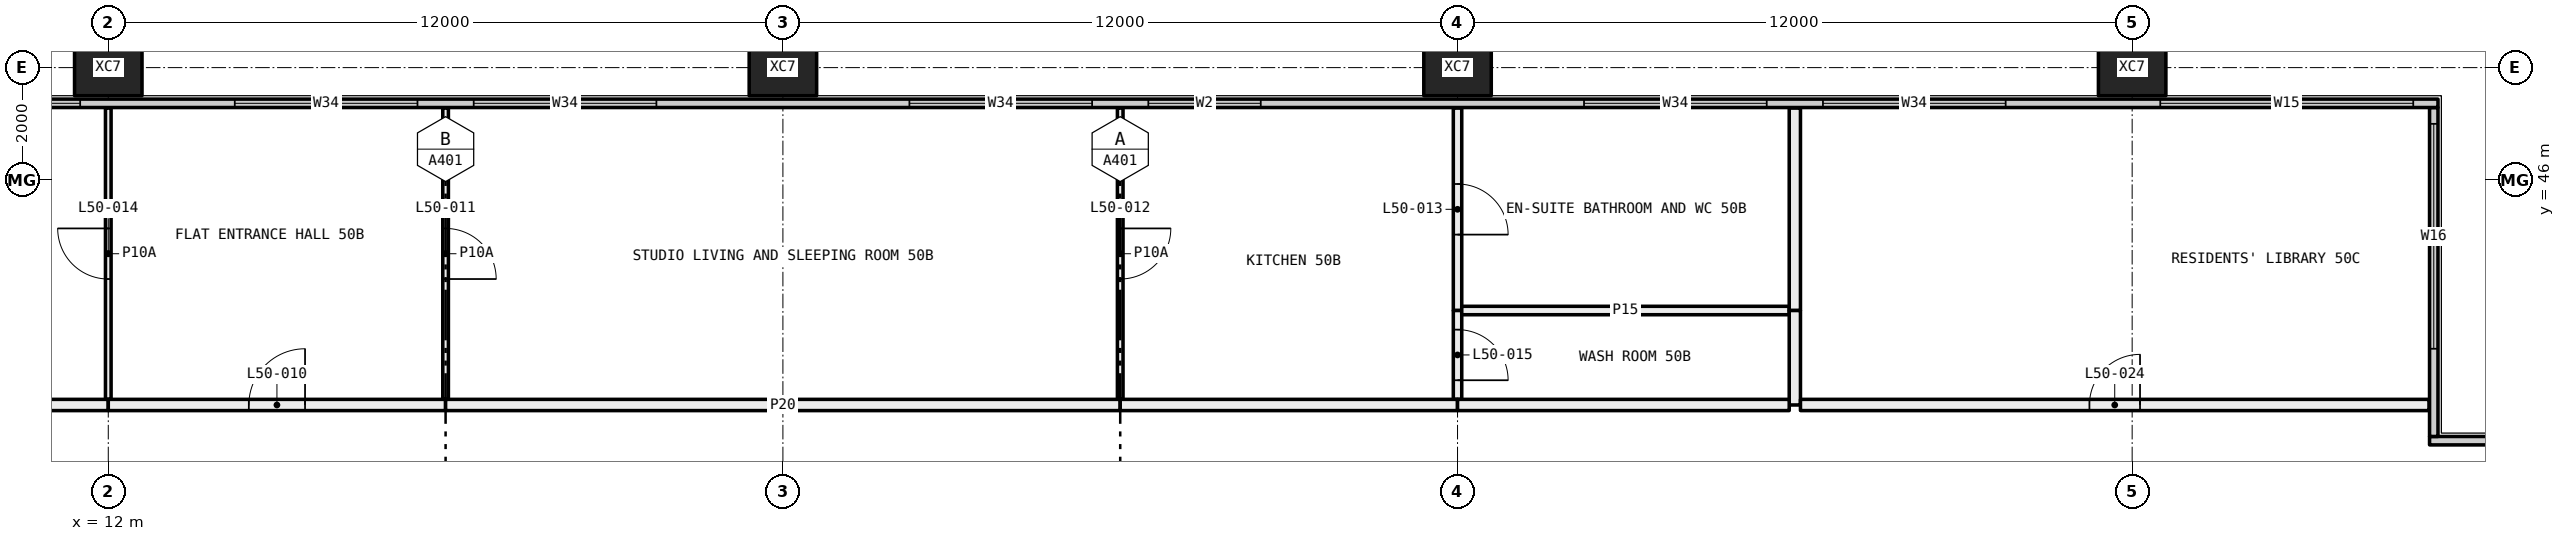
"""IFC4 building model, lengths in metres.
Left out: names, types, materials, properties, quantities, classifications, styles, units other than length and angle.
Written with IfcOpenShell. Run it as: python <this file> out.ifc"""

import sys

from ifc_helpers import new_model, si_unit, direction, frame, frame_2d, origin, origin_2d, place, context, subcontext, project, spatial, rectangle, hollow_rectangle, extrude, element, fill, save


model = new_model("IFC4")
c1 = context("Model", 3, precision=1e-05, world=origin(), true_north=direction((0.0, 1.0)))
c2 = subcontext(c1, "Body", "Model", "MODEL_VIEW")
j1 = project(units=[si_unit("LENGTHUNIT", "METRE"), si_unit("PLANEANGLEUNIT", "RADIAN")], contexts=[c1])
p1 = place(None, origin())
s1 = spatial("IfcSite", under=j1, at=p1, CompositionType="ELEMENT")
p2 = place(p1, origin())
s2 = spatial("IfcBuilding", under=s1, at=p2, CompositionType="ELEMENT")
p3 = place(p2, frame((0.0, 0.0, 189.3)))
s3 = spatial("IfcBuildingStorey", under=s2, at=p3, CompositionType="ELEMENT", Elevation=189.3)
for number, where, z_axis, x_axis in (
    (1, (12.0, 48.0, -0.4), (0.0, 0.0, 1.0), (1.0, 0.0, 0.0)),
    (2, (24.0, 48.0, -0.4), (0.0, 0.0, 1.0), (1.0, 0.0, 0.0)),
    (3, (36.0, 48.0, -0.4), (0.0, 0.0, 1.0), (1.0, 0.0, 0.0)),
    (4, (48.0, 48.0, -0.4), (0.0, 0.0, 1.0), (1.0, 0.0, 0.0)),
):
    element("IfcColumn", number, at=place(p3, frame(where, z_axis=z_axis, x_axis=x_axis)), inside=s3, PredefinedType="COLUMN", context=c2, shape_type="SweptSolid", body=[
        extrude(hollow_rectangle(XDim=1.2, YDim=1.0, WallThickness=0.045, at=origin_2d()), origin(), (0.0, 0.0, 1.0), 3.45),
    ])
p4 = place(p3, frame((53.29, 41.365, 0.0), z_axis=(0.0, 0.0, 1.0), x_axis=(1.0, 0.0, 0.0)))
e5 = element("IfcWall", 5, at=p4, inside=s3, PredefinedType="ELEMENTEDWALL", context=c2, shape_type="SweptSolid", body=[
    extrude(rectangle(XDim=6.15, YDim=0.15, at=frame_2d((3.075, 0.0))), origin(), (0.0, 0.0, 1.0), 3.05),
])
p5 = place(p4, frame((1.71, 0.0, 0.45)))
e6 = element("IfcOpeningElement", 6, at=p5, cuts=e5, PredefinedType="OPENING", context=c2, shape_type="SweptSolid", body=[
    extrude(rectangle(XDim=4.0, YDim=2.55, at=frame_2d((2.0, 1.275))), frame((0.0, 0.085, 0.0), z_axis=(0.0, -1.0, 0.0), x_axis=(1.0, 0.0, 0.0)), (0.0, 0.0, 1.0), 0.17),
])
p6 = place(p3, frame((53.365, 41.44, 0.0), z_axis=(0.0, 0.0, 1.0), x_axis=(0.0, 1.0, 0.0)))
e7 = element("IfcWall", 7, at=p6, inside=s3, PredefinedType="ELEMENTEDWALL", context=c2, shape_type="SweptSolid", body=[
    extrude(rectangle(XDim=5.85, YDim=0.15, at=frame_2d((2.925, 0.0))), origin(), (0.0, 0.0, 1.0), 3.05),
])
p7 = place(p6, frame((1.56, 0.0, 0.45)))
e8 = element("IfcOpeningElement", 8, at=p7, cuts=e7, PredefinedType="OPENING", context=c2, shape_type="SweptSolid", body=[
    extrude(rectangle(XDim=4.0, YDim=2.55, at=frame_2d((2.0, 1.275))), frame((0.0, 0.085, 0.0), z_axis=(0.0, -1.0, 0.0), x_axis=(1.0, 0.0, 0.0)), (0.0, 0.0, 1.0), 0.17),
])
p8 = place(p3, frame((6.56, 47.365, 0.0), z_axis=(0.0, 0.0, 1.0), x_axis=(1.0, 0.0, 0.0)))
e9 = element("IfcWall", 9, at=p8, inside=s3, PredefinedType="ELEMENTEDWALL", context=c2, shape_type="SweptSolid", body=[
    extrude(rectangle(XDim=46.88, YDim=0.15, at=frame_2d((23.44, 0.0))), origin(), (0.0, 0.0, 1.0), 3.05),
])
p9 = place(p8, frame((0.44, 0.0, 0.45)))
e10 = element("IfcOpeningElement", 10, at=p9, cuts=e9, PredefinedType="OPENING", context=c2, shape_type="SweptSolid", body=[
    extrude(rectangle(XDim=4.5, YDim=2.55, at=frame_2d((2.25, 1.275))), frame((0.0, 0.085, 0.0), z_axis=(0.0, -1.0, 0.0), x_axis=(1.0, 0.0, 0.0)), (0.0, 0.0, 1.0), 0.17),
])
p10 = place(p8, frame((7.69, 0.0, 0.45)))
e11 = element("IfcOpeningElement", 11, at=p10, cuts=e9, PredefinedType="OPENING", context=c2, shape_type="SweptSolid", body=[
    extrude(rectangle(XDim=3.25, YDim=2.55, at=frame_2d((1.625, 1.275))), frame((0.0, 0.085, 0.0), z_axis=(0.0, -1.0, 0.0), x_axis=(1.0, 0.0, 0.0)), (0.0, 0.0, 1.0), 0.17),
])
p11 = place(p8, frame((11.94, 0.0, 0.45)))
e12 = element("IfcOpeningElement", 12, at=p11, cuts=e9, PredefinedType="OPENING", context=c2, shape_type="SweptSolid", body=[
    extrude(rectangle(XDim=3.25, YDim=2.55, at=frame_2d((1.625, 1.275))), frame((0.0, 0.085, 0.0), z_axis=(0.0, -1.0, 0.0), x_axis=(1.0, 0.0, 0.0)), (0.0, 0.0, 1.0), 0.17),
])
p12 = place(p8, frame((19.69, 0.0, 0.45)))
e13 = element("IfcOpeningElement", 13, at=p12, cuts=e9, PredefinedType="OPENING", context=c2, shape_type="SweptSolid", body=[
    extrude(rectangle(XDim=3.25, YDim=2.55, at=frame_2d((1.625, 1.275))), frame((0.0, 0.085, 0.0), z_axis=(0.0, -1.0, 0.0), x_axis=(1.0, 0.0, 0.0)), (0.0, 0.0, 1.0), 0.17),
])
p13 = place(p8, frame((23.94, 0.0, 0.45)))
e14 = element("IfcOpeningElement", 14, at=p13, cuts=e9, PredefinedType="OPENING", context=c2, shape_type="SweptSolid", body=[
    extrude(rectangle(XDim=2.0, YDim=2.55, at=frame_2d((1.0, 1.275))), frame((0.0, 0.085, 0.0), z_axis=(0.0, -1.0, 0.0), x_axis=(1.0, 0.0, 0.0)), (0.0, 0.0, 1.0), 0.17),
])
p14 = place(p8, frame((31.69, 0.0, 0.45)))
e15 = element("IfcOpeningElement", 15, at=p14, cuts=e9, PredefinedType="OPENING", context=c2, shape_type="SweptSolid", body=[
    extrude(rectangle(XDim=3.25, YDim=2.55, at=frame_2d((1.625, 1.275))), frame((0.0, 0.085, 0.0), z_axis=(0.0, -1.0, 0.0), x_axis=(1.0, 0.0, 0.0)), (0.0, 0.0, 1.0), 0.17),
])
p15 = place(p8, frame((35.94, 0.0, 0.45)))
e16 = element("IfcOpeningElement", 16, at=p15, cuts=e9, PredefinedType="OPENING", context=c2, shape_type="SweptSolid", body=[
    extrude(rectangle(XDim=3.25, YDim=2.55, at=frame_2d((1.625, 1.275))), frame((0.0, 0.085, 0.0), z_axis=(0.0, -1.0, 0.0), x_axis=(1.0, 0.0, 0.0)), (0.0, 0.0, 1.0), 0.17),
])
p16 = place(p8, frame((41.94, 0.0, 0.45)))
e17 = element("IfcOpeningElement", 17, at=p16, cuts=e9, PredefinedType="OPENING", context=c2, shape_type="SweptSolid", body=[
    extrude(rectangle(XDim=4.5, YDim=2.55, at=frame_2d((2.25, 1.275))), frame((0.0, 0.085, 0.0), z_axis=(0.0, -1.0, 0.0), x_axis=(1.0, 0.0, 0.0)), (0.0, 0.0, 1.0), 0.17),
])
p17 = place(p3, frame((12.0, 42.1, 0.0), z_axis=(0.0, 0.0, 1.0), x_axis=(0.0, 1.0, 0.0)))
e18 = element("IfcWall", 18, at=p17, inside=s3, PredefinedType="PARTITIONING", context=c2, shape_type="SweptSolid", body=[
    extrude(rectangle(XDim=5.18, YDim=0.1, at=frame_2d((2.59, 0.0))), origin(), (0.0, 0.0, 1.0), 3.05),
])
p18 = place(p17, frame((2.14, 0.0, 0.0)))
e19 = element("IfcOpeningElement", 19, at=p18, cuts=e18, PredefinedType="OPENING", context=c2, shape_type="SweptSolid", body=[
    extrude(rectangle(XDim=0.9, YDim=2.1, at=frame_2d((0.45, 1.05))), frame((0.0, 0.06, 0.0), z_axis=(0.0, -1.0, 0.0), x_axis=(1.0, 0.0, 0.0)), (0.0, 0.0, 1.0), 0.12),
])
p19 = place(p3, frame((10.1, 42.0, 0.0), z_axis=(0.0, 0.0, 1.0), x_axis=(1.0, 0.0, 0.0)))
e20 = element("IfcWall", 20, at=p19, inside=s3, PredefinedType="PARTITIONING", context=c2, shape_type="SweptSolid", body=[
    extrude(rectangle(XDim=1.9, YDim=0.2, at=frame_2d((0.95, 0.0))), origin(), (0.0, 0.0, 1.0), 3.05),
])
p20 = place(p3, frame((18.0, 42.1, 0.0), z_axis=(0.0, 0.0, 1.0), x_axis=(0.0, 1.0, 0.0)))
e21 = element("IfcWall", 21, at=p20, inside=s3, PredefinedType="PARTITIONING", context=c2, shape_type="SweptSolid", body=[
    extrude(rectangle(XDim=5.18, YDim=0.1, at=frame_2d((2.59, 0.0))), origin(), (0.0, 0.0, 1.0), 3.05),
])
p21 = place(p20, frame((2.14, 0.0, 0.0)))
e22 = element("IfcOpeningElement", 22, at=p21, cuts=e21, PredefinedType="OPENING", context=c2, shape_type="SweptSolid", body=[
    extrude(rectangle(XDim=0.9, YDim=2.1, at=frame_2d((0.45, 1.05))), frame((0.0, 0.06, 0.0), z_axis=(0.0, -1.0, 0.0), x_axis=(1.0, 0.0, 0.0)), (0.0, 0.0, 1.0), 0.12),
])
p22 = place(p3, frame((12.0, 42.0, 0.0), z_axis=(0.0, 0.0, 1.0), x_axis=(1.0, 0.0, 0.0)))
e23 = element("IfcWall", 23, at=p22, inside=s3, PredefinedType="PARTITIONING", context=c2, shape_type="SweptSolid", body=[
    extrude(rectangle(XDim=6.0, YDim=0.2, at=frame_2d((3.0, 0.0))), origin(), (0.0, 0.0, 1.0), 3.05),
])
p23 = place(p22, frame((2.5, 0.0, 0.0)))
e24 = element("IfcOpeningElement", 24, at=p23, cuts=e23, PredefinedType="OPENING", context=c2, shape_type="SweptSolid", body=[
    extrude(rectangle(XDim=1.0, YDim=2.1, at=frame_2d((0.5, 1.05))), frame((0.0, 0.11, 0.0), z_axis=(0.0, -1.0, 0.0), x_axis=(1.0, 0.0, 0.0)), (0.0, 0.0, 1.0), 0.22),
])
p24 = place(p3, frame((30.0, 42.1, 0.0), z_axis=(0.0, 0.0, 1.0), x_axis=(0.0, 1.0, 0.0)))
e25 = element("IfcWall", 25, at=p24, inside=s3, PredefinedType="PARTITIONING", context=c2, shape_type="SweptSolid", body=[
    extrude(rectangle(XDim=5.18, YDim=0.1, at=frame_2d((2.59, 0.0))), origin(), (0.0, 0.0, 1.0), 3.05),
])
p25 = place(p24, frame((2.14, 0.0, 0.0)))
e26 = element("IfcOpeningElement", 26, at=p25, cuts=e25, PredefinedType="OPENING", context=c2, shape_type="SweptSolid", body=[
    extrude(rectangle(XDim=0.9, YDim=2.1, at=frame_2d((0.45, 1.05))), frame((0.0, 0.06, 0.0), z_axis=(0.0, -1.0, 0.0), x_axis=(1.0, 0.0, 0.0)), (0.0, 0.0, 1.0), 0.12),
])
p26 = place(p3, frame((18.0, 42.0, 0.0), z_axis=(0.0, 0.0, 1.0), x_axis=(1.0, 0.0, 0.0)))
e27 = element("IfcWall", 27, at=p26, inside=s3, PredefinedType="PARTITIONING", context=c2, shape_type="SweptSolid", body=[
    extrude(rectangle(XDim=12.0, YDim=0.2, at=frame_2d((6.0, 0.0))), origin(), (0.0, 0.0, 1.0), 3.05),
])
p27 = place(p3, frame((36.0, 43.68, 0.0), z_axis=(0.0, 0.0, 1.0), x_axis=(0.0, 1.0, 0.0)))
e28 = element("IfcWall", 28, at=p27, inside=s3, PredefinedType="PARTITIONING", context=c2, shape_type="SweptSolid", body=[
    extrude(rectangle(XDim=3.6, YDim=0.15, at=frame_2d((1.8, 0.0))), origin(), (0.0, 0.0, 1.0), 2.45),
])
p28 = place(p27, frame((1.35, 0.0, 0.0)))
e29 = element("IfcOpeningElement", 29, at=p28, cuts=e28, PredefinedType="OPENING", context=c2, shape_type="SweptSolid", body=[
    extrude(rectangle(XDim=0.9, YDim=2.1, at=frame_2d((0.45, 1.05))), frame((0.0, 0.085, 0.0), z_axis=(0.0, -1.0, 0.0), x_axis=(1.0, 0.0, 0.0)), (0.0, 0.0, 1.0), 0.17),
])
p29 = place(p3, frame((36.0, 42.1, 0.0), z_axis=(0.0, 0.0, 1.0), x_axis=(0.0, 1.0, 0.0)))
e30 = element("IfcWall", 30, at=p29, inside=s3, PredefinedType="PARTITIONING", context=c2, shape_type="SweptSolid", body=[
    extrude(rectangle(XDim=1.58, YDim=0.15, at=frame_2d((0.79, 0.0))), origin(), (0.0, 0.0, 1.0), 2.45),
])
p30 = place(p29, frame((0.34, 0.0, 0.0)))
e31 = element("IfcOpeningElement", 31, at=p30, cuts=e30, PredefinedType="OPENING", context=c2, shape_type="SweptSolid", body=[
    extrude(rectangle(XDim=0.9, YDim=2.1, at=frame_2d((0.45, 1.05))), frame((0.0, 0.085, 0.0), z_axis=(0.0, -1.0, 0.0), x_axis=(1.0, 0.0, 0.0)), (0.0, 0.0, 1.0), 0.17),
])
p31 = place(p3, frame((30.0, 42.0, 0.0), z_axis=(0.0, 0.0, 1.0), x_axis=(1.0, 0.0, 0.0)))
e32 = element("IfcWall", 32, at=p31, inside=s3, PredefinedType="PARTITIONING", context=c2, shape_type="SweptSolid", body=[
    extrude(rectangle(XDim=6.0, YDim=0.2, at=frame_2d((3.0, 0.0))), origin(), (0.0, 0.0, 1.0), 2.45),
])
p32 = place(p3, frame((36.075, 43.68, 0.0), z_axis=(0.0, 0.0, 1.0), x_axis=(1.0, 0.0, 0.0)))
e33 = element("IfcWall", 33, at=p32, inside=s3, PredefinedType="PARTITIONING", context=c2, shape_type="SweptSolid", body=[
    extrude(rectangle(XDim=5.825, YDim=0.15, at=frame_2d((2.913, 0.0))), origin(), (0.0, 0.0, 1.0), 2.45),
])
p33 = place(p3, frame((42.0, 43.68, 0.0), z_axis=(0.0, 0.0, 1.0), x_axis=(0.0, 1.0, 0.0)))
e34 = element("IfcWall", 34, at=p33, inside=s3, PredefinedType="PARTITIONING", context=c2, shape_type="SweptSolid", body=[
    extrude(rectangle(XDim=3.6, YDim=0.2, at=frame_2d((1.8, 0.0))), origin(), (0.0, 0.0, 1.0), 3.05),
])
p34 = place(p3, frame((42.0, 42.0, 0.0), z_axis=(0.0, 0.0, 1.0), x_axis=(0.0, 1.0, 0.0)))
e35 = element("IfcWall", 35, at=p34, inside=s3, PredefinedType="PARTITIONING", context=c2, shape_type="SweptSolid", body=[
    extrude(rectangle(XDim=1.68, YDim=0.2, at=frame_2d((0.84, 0.0))), origin(), (0.0, 0.0, 1.0), 3.05),
])
p35 = place(p3, frame((36.0, 42.0, 0.0), z_axis=(0.0, 0.0, 1.0), x_axis=(1.0, 0.0, 0.0)))
e36 = element("IfcWall", 36, at=p35, inside=s3, PredefinedType="PARTITIONING", context=c2, shape_type="SweptSolid", body=[
    extrude(rectangle(XDim=5.9, YDim=0.2, at=frame_2d((2.95, 0.0))), origin(), (0.0, 0.0, 1.0), 2.45),
])
p36 = place(p3, frame((42.1, 42.0, 0.0), z_axis=(0.0, 0.0, 1.0), x_axis=(1.0, 0.0, 0.0)))
e37 = element("IfcWall", 37, at=p36, inside=s3, PredefinedType="PARTITIONING", context=c2, shape_type="SweptSolid", body=[
    extrude(rectangle(XDim=11.18, YDim=0.2, at=frame_2d((5.59, 0.0))), origin(), (0.0, 0.0, 1.0), 3.05),
])
p37 = place(p36, frame((5.14, 0.0, 0.0)))
e38 = element("IfcOpeningElement", 38, at=p37, cuts=e37, PredefinedType="OPENING", context=c2, shape_type="SweptSolid", body=[
    extrude(rectangle(XDim=0.9, YDim=2.1, at=frame_2d((0.45, 1.05))), frame((0.0, 0.11, 0.0), z_axis=(0.0, -1.0, 0.0), x_axis=(1.0, 0.0, 0.0)), (0.0, 0.0, 1.0), 0.22),
])
p38 = place(p7, origin())
e39 = element("IfcWindow", 39, at=p38, inside=s3, PartitioningType="SINGLE_PANEL", PredefinedType="WINDOW", context=c2, shape_type="SweptSolid", body=[
    extrude(rectangle(XDim=4.0, YDim=2.55, at=frame_2d((2.0, 1.275))), frame((0.0, 0.03, 0.0), z_axis=(0.0, -1.0, 0.0), x_axis=(1.0, 0.0, 0.0)), (0.0, 0.0, 1.0), 0.06),
])
fill(e8, e39)
p39 = place(p9, origin())
e40 = element("IfcWindow", 40, at=p39, inside=s3, PartitioningType="SINGLE_PANEL", PredefinedType="WINDOW", context=c2, shape_type="SweptSolid", body=[
    extrude(rectangle(XDim=4.5, YDim=2.55, at=frame_2d((2.25, 1.275))), frame((0.0, 0.03, 0.0), z_axis=(0.0, -1.0, 0.0), x_axis=(1.0, 0.0, 0.0)), (0.0, 0.0, 1.0), 0.06),
])
fill(e10, e40)
p40 = place(p10, origin())
e41 = element("IfcWindow", 41, at=p40, inside=s3, PartitioningType="SINGLE_PANEL", PredefinedType="WINDOW", context=c2, shape_type="SweptSolid", body=[
    extrude(rectangle(XDim=3.25, YDim=2.55, at=frame_2d((1.625, 1.275))), frame((0.0, 0.03, 0.0), z_axis=(0.0, -1.0, 0.0), x_axis=(1.0, 0.0, 0.0)), (0.0, 0.0, 1.0), 0.06),
])
fill(e11, e41)
p41 = place(p11, origin())
e42 = element("IfcWindow", 42, at=p41, inside=s3, PartitioningType="SINGLE_PANEL", PredefinedType="WINDOW", context=c2, shape_type="SweptSolid", body=[
    extrude(rectangle(XDim=3.25, YDim=2.55, at=frame_2d((1.625, 1.275))), frame((0.0, 0.03, 0.0), z_axis=(0.0, -1.0, 0.0), x_axis=(1.0, 0.0, 0.0)), (0.0, 0.0, 1.0), 0.06),
])
fill(e12, e42)
p42 = place(p12, origin())
e43 = element("IfcWindow", 43, at=p42, inside=s3, PartitioningType="SINGLE_PANEL", PredefinedType="WINDOW", context=c2, shape_type="SweptSolid", body=[
    extrude(rectangle(XDim=3.25, YDim=2.55, at=frame_2d((1.625, 1.275))), frame((0.0, 0.03, 0.0), z_axis=(0.0, -1.0, 0.0), x_axis=(1.0, 0.0, 0.0)), (0.0, 0.0, 1.0), 0.06),
])
fill(e13, e43)
p43 = place(p13, origin())
e44 = element("IfcWindow", 44, at=p43, inside=s3, PartitioningType="SINGLE_PANEL", PredefinedType="WINDOW", context=c2, shape_type="SweptSolid", body=[
    extrude(rectangle(XDim=2.0, YDim=2.55, at=frame_2d((1.0, 1.275))), frame((0.0, 0.03, 0.0), z_axis=(0.0, -1.0, 0.0), x_axis=(1.0, 0.0, 0.0)), (0.0, 0.0, 1.0), 0.06),
])
fill(e14, e44)
p44 = place(p14, origin())
e45 = element("IfcWindow", 45, at=p44, inside=s3, PartitioningType="SINGLE_PANEL", PredefinedType="WINDOW", context=c2, shape_type="SweptSolid", body=[
    extrude(rectangle(XDim=3.25, YDim=2.55, at=frame_2d((1.625, 1.275))), frame((0.0, 0.03, 0.0), z_axis=(0.0, -1.0, 0.0), x_axis=(1.0, 0.0, 0.0)), (0.0, 0.0, 1.0), 0.06),
])
fill(e15, e45)
p45 = place(p15, origin())
e46 = element("IfcWindow", 46, at=p45, inside=s3, PartitioningType="SINGLE_PANEL", PredefinedType="WINDOW", context=c2, shape_type="SweptSolid", body=[
    extrude(rectangle(XDim=3.25, YDim=2.55, at=frame_2d((1.625, 1.275))), frame((0.0, 0.03, 0.0), z_axis=(0.0, -1.0, 0.0), x_axis=(1.0, 0.0, 0.0)), (0.0, 0.0, 1.0), 0.06),
])
fill(e16, e46)
p46 = place(p16, origin())
e47 = element("IfcWindow", 47, at=p46, inside=s3, PartitioningType="SINGLE_PANEL", PredefinedType="WINDOW", context=c2, shape_type="SweptSolid", body=[
    extrude(rectangle(XDim=4.5, YDim=2.55, at=frame_2d((2.25, 1.275))), frame((0.0, 0.03, 0.0), z_axis=(0.0, -1.0, 0.0), x_axis=(1.0, 0.0, 0.0)), (0.0, 0.0, 1.0), 0.06),
])
fill(e17, e47)
p47 = place(p23, origin())
e48 = element("IfcDoor", 48, at=p47, inside=s3, OperationType="SINGLE_SWING_LEFT", PredefinedType="DOOR", context=c2, shape_type="SweptSolid", body=[
    extrude(rectangle(XDim=1.0, YDim=2.1, at=frame_2d((0.5, 1.05))), frame((0.0, 0.025, 0.0), z_axis=(0.0, -1.0, 0.0), x_axis=(1.0, 0.0, 0.0)), (0.0, 0.0, 1.0), 0.05),
])
fill(e24, e48)
p48 = place(p21, frame((0.9, 0.0, 0.0), x_axis=(-1.0, 0.0, 0.0)))
e49 = element("IfcDoor", 49, at=p48, inside=s3, OperationType="SINGLE_SWING_LEFT", PredefinedType="DOOR", context=c2, shape_type="SweptSolid", body=[
    extrude(rectangle(XDim=0.9, YDim=2.1, at=frame_2d((0.45, 1.05))), frame((0.0, 0.025, 0.0), z_axis=(0.0, -1.0, 0.0), x_axis=(1.0, 0.0, 0.0)), (0.0, 0.0, 1.0), 0.05),
])
fill(e22, e49)
p49 = place(p25, frame((0.9, 0.0, 0.0), x_axis=(-1.0, 0.0, 0.0)))
e50 = element("IfcDoor", 50, at=p49, inside=s3, OperationType="SINGLE_SWING_RIGHT", PredefinedType="DOOR", context=c2, shape_type="SweptSolid", body=[
    extrude(rectangle(XDim=0.9, YDim=2.1, at=frame_2d((0.45, 1.05))), frame((0.0, 0.025, 0.0), z_axis=(0.0, -1.0, 0.0), x_axis=(1.0, 0.0, 0.0)), (0.0, 0.0, 1.0), 0.05),
])
fill(e26, e50)
p50 = place(p28, frame((0.9, 0.0, 0.0), x_axis=(-1.0, 0.0, 0.0)))
e51 = element("IfcDoor", 51, at=p50, inside=s3, OperationType="SINGLE_SWING_LEFT", PredefinedType="DOOR", context=c2, shape_type="SweptSolid", body=[
    extrude(rectangle(XDim=0.9, YDim=2.1, at=frame_2d((0.45, 1.05))), frame((0.0, 0.025, 0.0), z_axis=(0.0, -1.0, 0.0), x_axis=(1.0, 0.0, 0.0)), (0.0, 0.0, 1.0), 0.05),
])
fill(e29, e51)
p51 = place(p18, origin())
e52 = element("IfcDoor", 52, at=p51, inside=s3, OperationType="SINGLE_SWING_LEFT", PredefinedType="DOOR", context=c2, shape_type="SweptSolid", body=[
    extrude(rectangle(XDim=0.9, YDim=2.1, at=frame_2d((0.45, 1.05))), frame((0.0, 0.025, 0.0), z_axis=(0.0, -1.0, 0.0), x_axis=(1.0, 0.0, 0.0)), (0.0, 0.0, 1.0), 0.05),
])
fill(e19, e52)
p52 = place(p30, frame((0.9, 0.0, 0.0), x_axis=(-1.0, 0.0, 0.0)))
e53 = element("IfcDoor", 53, at=p52, inside=s3, OperationType="SINGLE_SWING_LEFT", PredefinedType="DOOR", context=c2, shape_type="SweptSolid", body=[
    extrude(rectangle(XDim=0.9, YDim=2.1, at=frame_2d((0.45, 1.05))), frame((0.0, 0.025, 0.0), z_axis=(0.0, -1.0, 0.0), x_axis=(1.0, 0.0, 0.0)), (0.0, 0.0, 1.0), 0.05),
])
fill(e31, e53)
p53 = place(p37, origin())
e54 = element("IfcDoor", 54, at=p53, inside=s3, OperationType="SINGLE_SWING_LEFT", PredefinedType="DOOR", context=c2, shape_type="SweptSolid", body=[
    extrude(rectangle(XDim=0.9, YDim=2.1, at=frame_2d((0.45, 1.05))), frame((0.0, 0.025, 0.0), z_axis=(0.0, -1.0, 0.0), x_axis=(1.0, 0.0, 0.0)), (0.0, 0.0, 1.0), 0.05),
])
fill(e38, e54)
save(model, sys.argv[1])
